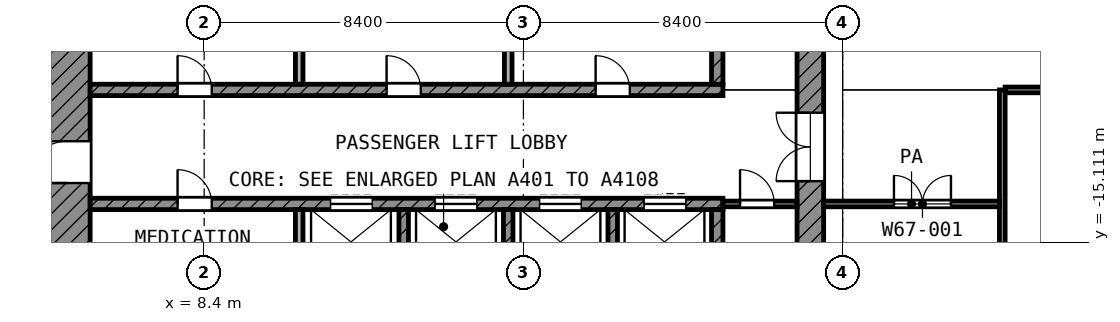
"""IFC4 building model, lengths in metres.
Left out: names, types, materials, properties, quantities, classifications, styles, units other than length and angle.
Written with IfcOpenShell. Run it as: python <this file> out.ifc"""

import sys

from ifc_helpers import new_model, si_unit, direction, frame, frame_2d, origin, place, context, subcontext, project, spatial, rectangle, extrude, element, fill, save


model = new_model("IFC4")
c1 = context("Model", 3, precision=1e-05, world=origin(), true_north=direction((0.0, 1.0)))
c2 = subcontext(c1, "Body", "Model", "MODEL_VIEW")
j1 = project(units=[si_unit("LENGTHUNIT", "METRE"), si_unit("PLANEANGLEUNIT", "RADIAN")], contexts=[c1])
p1 = place(None, origin())
s1 = spatial("IfcSite", under=j1, at=p1, CompositionType="ELEMENT")
p2 = place(p1, origin())
s2 = spatial("IfcBuilding", under=s1, at=p2, CompositionType="ELEMENT")
p3 = place(p2, frame((0.0, 0.0, 311.2)))
s3 = spatial("IfcBuildingStorey", under=s2, at=p3, CompositionType="ELEMENT", Elevation=311.2)
p4 = place(p3, frame((4.8, -24.7, 0.0), z_axis=(0.0, 0.0, 1.0), x_axis=(0.0, 1.0, 0.0)))
e1 = element("IfcWall", 1, at=p4, inside=s3, PredefinedType="SHEAR", context=c2, shape_type="SweptSolid", body=[
    extrude(rectangle(XDim=19.3, YDim=1.2, at=frame_2d((9.65, 0.0))), origin(), (0.0, 0.0, 1.0), 3.6),
])
p5 = place(p4, frame((11.15, 0.0, 0.0)))
e2 = element("IfcOpeningElement", 2, at=p5, cuts=e1, PredefinedType="OPENING", context=c2, shape_type="SweptSolid", body=[
    extrude(rectangle(XDim=1.1, YDim=2.1, at=frame_2d((0.55, 1.05))), frame((0.0, 0.61, 0.0), z_axis=(0.0, -1.0, 0.0), x_axis=(1.0, 0.0, 0.0)), (0.0, 0.0, 1.0), 1.22),
])
p6 = place(p4, frame((1.85, 0.0, 0.0)))
e3 = element("IfcOpeningElement", 3, at=p6, cuts=e1, PredefinedType="OPENING", context=c2, shape_type="SweptSolid", body=[
    extrude(rectangle(XDim=1.1, YDim=2.1, at=frame_2d((0.55, 1.05))), frame((0.0, 0.61, 0.0), z_axis=(0.0, -1.0, 0.0), x_axis=(1.0, 0.0, 0.0)), (0.0, 0.0, 1.0), 1.22),
])
p7 = place(p3, frame((24.35, -24.0, 0.0), z_axis=(0.0, 0.0, 1.0), x_axis=(0.0, 1.0, 0.0)))
e4 = element("IfcWall", 4, at=p7, inside=s3, PredefinedType="SHEAR", context=c2, shape_type="SweptSolid", body=[
    extrude(rectangle(XDim=18.6, YDim=0.7, at=frame_2d((9.3, 0.0))), origin(), (0.0, 0.0, 1.0), 3.6),
])
p8 = place(p7, frame((10.5, 0.0, 0.0)))
e5 = element("IfcOpeningElement", 5, at=p8, cuts=e4, PredefinedType="OPENING", context=c2, shape_type="SweptSolid", body=[
    extrude(rectangle(XDim=1.8, YDim=2.1, at=frame_2d((0.9, 1.05))), frame((0.0, 0.36, 0.0), z_axis=(0.0, -1.0, 0.0), x_axis=(1.0, 0.0, 0.0)), (0.0, 0.0, 1.0), 0.72),
])
p9 = place(p3, frame((5.4, -11.1, 0.0), z_axis=(0.0, 0.0, 1.0), x_axis=(1.0, 0.0, 0.0)))
e6 = element("IfcWall", 6, at=p9, inside=s3, PredefinedType="SHEAR", context=c2, shape_type="SweptSolid", body=[
    extrude(rectangle(XDim=16.65, YDim=0.3, at=frame_2d((8.325, 0.0))), origin(), (0.0, 0.0, 1.0), 3.6),
])
p10 = place(p9, frame((2.3, 0.0, 0.0)))
e7 = element("IfcOpeningElement", 7, at=p10, cuts=e6, PredefinedType="OPENING", context=c2, shape_type="SweptSolid", body=[
    extrude(rectangle(XDim=0.9, YDim=2.1, at=frame_2d((0.45, 1.05))), frame((0.0, 0.16, 0.0), z_axis=(0.0, -1.0, 0.0), x_axis=(1.0, 0.0, 0.0)), (0.0, 0.0, 1.0), 0.32),
])
p11 = place(p9, frame((7.8, 0.0, 0.0)))
e8 = element("IfcOpeningElement", 8, at=p11, cuts=e6, PredefinedType="OPENING", context=c2, shape_type="SweptSolid", body=[
    extrude(rectangle(XDim=0.9, YDim=2.1, at=frame_2d((0.45, 1.05))), frame((0.0, 0.16, 0.0), z_axis=(0.0, -1.0, 0.0), x_axis=(1.0, 0.0, 0.0)), (0.0, 0.0, 1.0), 0.32),
])
p12 = place(p9, frame((13.3, 0.0, 0.0)))
e9 = element("IfcOpeningElement", 9, at=p12, cuts=e6, PredefinedType="OPENING", context=c2, shape_type="SweptSolid", body=[
    extrude(rectangle(XDim=0.9, YDim=2.1, at=frame_2d((0.45, 1.05))), frame((0.0, 0.16, 0.0), z_axis=(0.0, -1.0, 0.0), x_axis=(1.0, 0.0, 0.0)), (0.0, 0.0, 1.0), 0.32),
])
p13 = place(p3, frame((5.4, -14.1, 0.0), z_axis=(0.0, 0.0, 1.0), x_axis=(1.0, 0.0, 0.0)))
e10 = element("IfcWall", 10, at=p13, inside=s3, PredefinedType="SHEAR", context=c2, shape_type="SweptSolid", body=[
    extrude(rectangle(XDim=16.65, YDim=0.3, at=frame_2d((8.325, 0.0))), origin(), (0.0, 0.0, 1.0), 3.6),
])
p14 = place(p13, frame((6.325, 0.0, 0.0)))
e11 = element("IfcOpeningElement", 11, at=p14, cuts=e10, PredefinedType="OPENING", context=c2, shape_type="SweptSolid", body=[
    extrude(rectangle(XDim=1.1, YDim=2.1, at=frame_2d((0.55, 1.05))), frame((0.0, 0.16, 0.0), z_axis=(0.0, -1.0, 0.0), x_axis=(1.0, 0.0, 0.0)), (0.0, 0.0, 1.0), 0.32),
])
p15 = place(p13, frame((9.075, 0.0, 0.0)))
e12 = element("IfcOpeningElement", 12, at=p15, cuts=e10, PredefinedType="OPENING", context=c2, shape_type="SweptSolid", body=[
    extrude(rectangle(XDim=1.1, YDim=2.1, at=frame_2d((0.55, 1.05))), frame((0.0, 0.16, 0.0), z_axis=(0.0, -1.0, 0.0), x_axis=(1.0, 0.0, 0.0)), (0.0, 0.0, 1.0), 0.32),
])
p16 = place(p13, frame((11.825, 0.0, 0.0)))
e13 = element("IfcOpeningElement", 13, at=p16, cuts=e10, PredefinedType="OPENING", context=c2, shape_type="SweptSolid", body=[
    extrude(rectangle(XDim=1.1, YDim=2.1, at=frame_2d((0.55, 1.05))), frame((0.0, 0.16, 0.0), z_axis=(0.0, -1.0, 0.0), x_axis=(1.0, 0.0, 0.0)), (0.0, 0.0, 1.0), 0.32),
])
p17 = place(p13, frame((14.575, 0.0, 0.0)))
e14 = element("IfcOpeningElement", 14, at=p17, cuts=e10, PredefinedType="OPENING", context=c2, shape_type="SweptSolid", body=[
    extrude(rectangle(XDim=1.1, YDim=2.1, at=frame_2d((0.55, 1.05))), frame((0.0, 0.16, 0.0), z_axis=(0.0, -1.0, 0.0), x_axis=(1.0, 0.0, 0.0)), (0.0, 0.0, 1.0), 0.32),
])
p18 = place(p13, frame((2.3, 0.0, 0.0)))
e15 = element("IfcOpeningElement", 15, at=p18, cuts=e10, PredefinedType="OPENING", context=c2, shape_type="SweptSolid", body=[
    extrude(rectangle(XDim=0.9, YDim=2.1, at=frame_2d((0.45, 1.05))), frame((0.0, 0.16, 0.0), z_axis=(0.0, -1.0, 0.0), x_axis=(1.0, 0.0, 0.0)), (0.0, 0.0, 1.0), 0.32),
])
p19 = place(p3, frame((21.9, -10.95, 0.0), z_axis=(0.0, 0.0, 1.0), x_axis=(0.0, 1.0, 0.0)))
e16 = element("IfcWall", 16, at=p19, inside=s3, PredefinedType="SHEAR", context=c2, shape_type="SweptSolid", body=[
    extrude(rectangle(XDim=2.35, YDim=0.3, at=frame_2d((1.175, 0.0))), origin(), (0.0, 0.0, 1.0), 3.6),
])
p20 = place(p3, frame((21.9, -16.6, 0.0), z_axis=(0.0, 0.0, 1.0), x_axis=(0.0, 1.0, 0.0)))
e17 = element("IfcWall", 17, at=p20, inside=s3, PredefinedType="SHEAR", context=c2, shape_type="SweptSolid", body=[
    extrude(rectangle(XDim=2.35, YDim=0.3, at=frame_2d((1.175, 0.0))), origin(), (0.0, 0.0, 1.0), 3.6),
])
for number, where, z_axis, x_axis in (
    (18, (10.9, -10.95, 0.0), (0.0, 0.0, 1.0), (0.0, 1.0, 0.0)),
    (19, (16.4, -10.95, 0.0), (0.0, 0.0, 1.0), (0.0, 1.0, 0.0)),
):
    element("IfcWall", number, at=place(p3, frame(where, z_axis=z_axis, x_axis=x_axis)), inside=s3, PredefinedType="PARTITIONING", context=c2, shape_type="SweptSolid", body=[
        extrude(rectangle(XDim=2.35, YDim=0.2, at=frame_2d((1.175, 0.0))), origin(), (0.0, 0.0, 1.0), 3.6),
    ])
p21 = place(p3, frame((10.9, -16.6, 0.0), z_axis=(0.0, 0.0, 1.0), x_axis=(0.0, 1.0, 0.0)))
e20 = element("IfcWall", 20, at=p21, inside=s3, PredefinedType="PARTITIONING", context=c2, shape_type="SweptSolid", body=[
    extrude(rectangle(XDim=2.35, YDim=0.2, at=frame_2d((1.175, 0.0))), origin(), (0.0, 0.0, 1.0), 3.6),
])
for number, where, z_axis, x_axis in (
    (21, (13.65, -16.6, 0.0), (0.0, 0.0, 1.0), (0.0, 1.0, 0.0)),
    (22, (16.4, -16.6, 0.0), (0.0, 0.0, 1.0), (0.0, 1.0, 0.0)),
    (23, (19.15, -16.6, 0.0), (0.0, 0.0, 1.0), (0.0, 1.0, 0.0)),
):
    element("IfcWall", number, at=place(p3, frame(where, z_axis=z_axis, x_axis=x_axis)), inside=s3, PredefinedType="SHEAR", context=c2, shape_type="SweptSolid", body=[
        extrude(rectangle(XDim=2.35, YDim=0.25, at=frame_2d((1.175, 0.0))), origin(), (0.0, 0.0, 1.0), 3.6),
    ])
p22 = place(p3, frame((22.05, -14.1, 0.0), z_axis=(0.0, 0.0, 1.0), x_axis=(1.0, 0.0, 0.0)))
e24 = element("IfcWall", 24, at=p22, inside=s3, PredefinedType="PARTITIONING", context=c2, shape_type="SweptSolid", body=[
    extrude(rectangle(XDim=1.95, YDim=0.15, at=frame_2d((0.975, 0.0))), origin(), (0.0, 0.0, 1.0), 3.6),
])
p23 = place(p22, frame((0.45, 0.0, 0.0)))
e25 = element("IfcOpeningElement", 25, at=p23, cuts=e24, PredefinedType="OPENING", context=c2, shape_type="SweptSolid", body=[
    extrude(rectangle(XDim=0.9, YDim=2.1, at=frame_2d((0.45, 1.05))), frame((0.0, 0.085, 0.0), z_axis=(0.0, -1.0, 0.0), x_axis=(1.0, 0.0, 0.0)), (0.0, 0.0, 1.0), 0.17),
])
p24 = place(p3, frame((24.7, -14.1, 0.0), z_axis=(0.0, 0.0, 1.0), x_axis=(1.0, 0.0, 0.0)))
e26 = element("IfcWall", 26, at=p24, inside=s3, PredefinedType="PARTITIONING", context=c2, shape_type="SweptSolid", body=[
    extrude(rectangle(XDim=4.625, YDim=0.15, at=frame_2d((2.312, 0.0))), origin(), (0.0, 0.0, 1.0), 3.6),
])
p25 = place(p24, frame((1.85, 0.0, 0.0)))
e27 = element("IfcOpeningElement", 27, at=p25, cuts=e26, PredefinedType="OPENING", context=c2, shape_type="SweptSolid", body=[
    extrude(rectangle(XDim=1.5, YDim=2.1, at=frame_2d((0.75, 1.05))), frame((0.0, 0.085, 0.0), z_axis=(0.0, -1.0, 0.0), x_axis=(1.0, 0.0, 0.0)), (0.0, 0.0, 1.0), 0.17),
])
p26 = place(p3, frame((29.475, -11.1, 0.0), z_axis=(0.0, 0.0, 1.0), x_axis=(1.0, 0.0, 0.0)))
e28 = element("IfcWall", 28, at=p26, inside=s3, PredefinedType="PARTITIONING", context=c2, shape_type="SweptSolid", body=[
    extrude(rectangle(XDim=29.245, YDim=0.15, at=frame_2d((14.623, 0.0))), origin(), (0.0, 0.0, 1.0), 3.6),
])
p27 = place(p26, frame((3.525, 0.0, 0.0)))
e29 = element("IfcOpeningElement", 29, at=p27, cuts=e28, PredefinedType="OPENING", context=c2, shape_type="SweptSolid", body=[
    extrude(rectangle(XDim=1.2, YDim=2.1, at=frame_2d((0.6, 1.05))), frame((0.0, 0.085, 0.0), z_axis=(0.0, -1.0, 0.0), x_axis=(1.0, 0.0, 0.0)), (0.0, 0.0, 1.0), 0.17),
])
p28 = place(p26, frame((15.285, 0.0, 0.0)))
e30 = element("IfcOpeningElement", 30, at=p28, cuts=e28, PredefinedType="OPENING", context=c2, shape_type="SweptSolid", body=[
    extrude(rectangle(XDim=1.2, YDim=2.1, at=frame_2d((0.6, 1.05))), frame((0.0, 0.085, 0.0), z_axis=(0.0, -1.0, 0.0), x_axis=(1.0, 0.0, 0.0)), (0.0, 0.0, 1.0), 0.17),
])
p29 = place(p26, frame((13.745, 0.0, 0.0)))
e31 = element("IfcOpeningElement", 31, at=p29, cuts=e28, PredefinedType="OPENING", context=c2, shape_type="SweptSolid", body=[
    extrude(rectangle(XDim=1.2, YDim=2.1, at=frame_2d((0.6, 1.05))), frame((0.0, 0.085, 0.0), z_axis=(0.0, -1.0, 0.0), x_axis=(1.0, 0.0, 0.0)), (0.0, 0.0, 1.0), 0.17),
])
p30 = place(p26, frame((18.325, 0.0, 0.0)))
e32 = element("IfcOpeningElement", 32, at=p30, cuts=e28, PredefinedType="OPENING", context=c2, shape_type="SweptSolid", body=[
    extrude(rectangle(XDim=1.0, YDim=2.1, at=frame_2d((0.5, 1.05))), frame((0.0, 0.085, 0.0), z_axis=(0.0, -1.0, 0.0), x_axis=(1.0, 0.0, 0.0)), (0.0, 0.0, 1.0), 0.17),
])
p31 = place(p26, frame((24.375, 0.0, 0.0)))
e33 = element("IfcOpeningElement", 33, at=p31, cuts=e28, PredefinedType="OPENING", context=c2, shape_type="SweptSolid", body=[
    extrude(rectangle(XDim=1.5, YDim=2.1, at=frame_2d((0.75, 1.05))), frame((0.0, 0.085, 0.0), z_axis=(0.0, -1.0, 0.0), x_axis=(1.0, 0.0, 0.0)), (0.0, 0.0, 1.0), 0.17),
])
p32 = place(p3, frame((29.4, -31.198, 0.0), z_axis=(0.0, 0.0, 1.0), x_axis=(0.0, 1.0, 0.0)))
e34 = element("IfcWall", 34, at=p32, inside=s3, PredefinedType="PARTITIONING", context=c2, shape_type="SweptSolid", body=[
    extrude(rectangle(XDim=20.098, YDim=0.15, at=frame_2d((10.049, 0.0))), origin(), (0.0, 0.0, 1.0), 3.6),
])
p33 = place(p14, origin())
e35 = element("IfcDoor", 35, at=p33, inside=s3, OperationType="DOUBLE_DOOR_SLIDING", PredefinedType="DOOR", context=c2, shape_type="SweptSolid", body=[
    extrude(rectangle(XDim=1.1, YDim=2.1, at=frame_2d((0.55, 1.05))), frame((0.0, 0.025, 0.0), z_axis=(0.0, -1.0, 0.0), x_axis=(1.0, 0.0, 0.0)), (0.0, 0.0, 1.0), 0.05),
])
fill(e11, e35)
p34 = place(p15, origin())
e36 = element("IfcDoor", 36, at=p34, inside=s3, OperationType="DOUBLE_DOOR_SLIDING", PredefinedType="DOOR", context=c2, shape_type="SweptSolid", body=[
    extrude(rectangle(XDim=1.1, YDim=2.1, at=frame_2d((0.55, 1.05))), frame((0.0, 0.025, 0.0), z_axis=(0.0, -1.0, 0.0), x_axis=(1.0, 0.0, 0.0)), (0.0, 0.0, 1.0), 0.05),
])
fill(e12, e36)
p35 = place(p16, origin())
e37 = element("IfcDoor", 37, at=p35, inside=s3, OperationType="DOUBLE_DOOR_SLIDING", PredefinedType="DOOR", context=c2, shape_type="SweptSolid", body=[
    extrude(rectangle(XDim=1.1, YDim=2.1, at=frame_2d((0.55, 1.05))), frame((0.0, 0.025, 0.0), z_axis=(0.0, -1.0, 0.0), x_axis=(1.0, 0.0, 0.0)), (0.0, 0.0, 1.0), 0.05),
])
fill(e13, e37)
p36 = place(p17, origin())
e38 = element("IfcDoor", 38, at=p36, inside=s3, OperationType="DOUBLE_DOOR_SLIDING", PredefinedType="DOOR", context=c2, shape_type="SweptSolid", body=[
    extrude(rectangle(XDim=1.1, YDim=2.1, at=frame_2d((0.55, 1.05))), frame((0.0, 0.025, 0.0), z_axis=(0.0, -1.0, 0.0), x_axis=(1.0, 0.0, 0.0)), (0.0, 0.0, 1.0), 0.05),
])
fill(e14, e38)
p37 = place(p5, origin())
e39 = element("IfcDoor", 39, at=p37, inside=s3, OperationType="SINGLE_SWING_LEFT", PredefinedType="DOOR", context=c2, shape_type="SweptSolid", body=[
    extrude(rectangle(XDim=1.1, YDim=2.1, at=frame_2d((0.55, 1.05))), frame((0.0, 0.025, 0.0), z_axis=(0.0, -1.0, 0.0), x_axis=(1.0, 0.0, 0.0)), (0.0, 0.0, 1.0), 0.05),
])
fill(e2, e39)
p38 = place(p8, origin())
e40 = element("IfcDoor", 40, at=p38, inside=s3, OperationType="DOUBLE_DOOR_SINGLE_SWING", PredefinedType="DOOR", context=c2, shape_type="SweptSolid", body=[
    extrude(rectangle(XDim=1.8, YDim=2.1, at=frame_2d((0.9, 1.05))), frame((0.0, 0.025, 0.0), z_axis=(0.0, -1.0, 0.0), x_axis=(1.0, 0.0, 0.0)), (0.0, 0.0, 1.0), 0.05),
])
fill(e5, e40)
p39 = place(p23, origin())
e41 = element("IfcDoor", 41, at=p39, inside=s3, OperationType="SINGLE_SWING_LEFT", PredefinedType="DOOR", context=c2, shape_type="SweptSolid", body=[
    extrude(rectangle(XDim=0.9, YDim=2.1, at=frame_2d((0.45, 1.05))), frame((0.0, 0.025, 0.0), z_axis=(0.0, -1.0, 0.0), x_axis=(1.0, 0.0, 0.0)), (0.0, 0.0, 1.0), 0.05),
])
fill(e25, e41)
p40 = place(p10, origin())
e42 = element("IfcDoor", 42, at=p40, inside=s3, OperationType="SINGLE_SWING_LEFT", PredefinedType="DOOR", context=c2, shape_type="SweptSolid", body=[
    extrude(rectangle(XDim=0.9, YDim=2.1, at=frame_2d((0.45, 1.05))), frame((0.0, 0.025, 0.0), z_axis=(0.0, -1.0, 0.0), x_axis=(1.0, 0.0, 0.0)), (0.0, 0.0, 1.0), 0.05),
])
fill(e7, e42)
p41 = place(p11, origin())
e43 = element("IfcDoor", 43, at=p41, inside=s3, OperationType="SINGLE_SWING_LEFT", PredefinedType="DOOR", context=c2, shape_type="SweptSolid", body=[
    extrude(rectangle(XDim=0.9, YDim=2.1, at=frame_2d((0.45, 1.05))), frame((0.0, 0.025, 0.0), z_axis=(0.0, -1.0, 0.0), x_axis=(1.0, 0.0, 0.0)), (0.0, 0.0, 1.0), 0.05),
])
fill(e8, e43)
p42 = place(p12, origin())
e44 = element("IfcDoor", 44, at=p42, inside=s3, OperationType="SINGLE_SWING_LEFT", PredefinedType="DOOR", context=c2, shape_type="SweptSolid", body=[
    extrude(rectangle(XDim=0.9, YDim=2.1, at=frame_2d((0.45, 1.05))), frame((0.0, 0.025, 0.0), z_axis=(0.0, -1.0, 0.0), x_axis=(1.0, 0.0, 0.0)), (0.0, 0.0, 1.0), 0.05),
])
fill(e9, e44)
p43 = place(p18, origin())
e45 = element("IfcDoor", 45, at=p43, inside=s3, OperationType="SINGLE_SWING_LEFT", PredefinedType="DOOR", context=c2, shape_type="SweptSolid", body=[
    extrude(rectangle(XDim=0.9, YDim=2.1, at=frame_2d((0.45, 1.05))), frame((0.0, 0.025, 0.0), z_axis=(0.0, -1.0, 0.0), x_axis=(1.0, 0.0, 0.0)), (0.0, 0.0, 1.0), 0.05),
])
fill(e15, e45)
p44 = place(p25, origin())
e46 = element("IfcDoor", 46, at=p44, inside=s3, OperationType="DOUBLE_DOOR_SINGLE_SWING", PredefinedType="DOOR", context=c2, shape_type="SweptSolid", body=[
    extrude(rectangle(XDim=1.5, YDim=2.1, at=frame_2d((0.75, 1.05))), frame((0.0, 0.025, 0.0), z_axis=(0.0, -1.0, 0.0), x_axis=(1.0, 0.0, 0.0)), (0.0, 0.0, 1.0), 0.05),
])
fill(e27, e46)
save(model, sys.argv[1])
